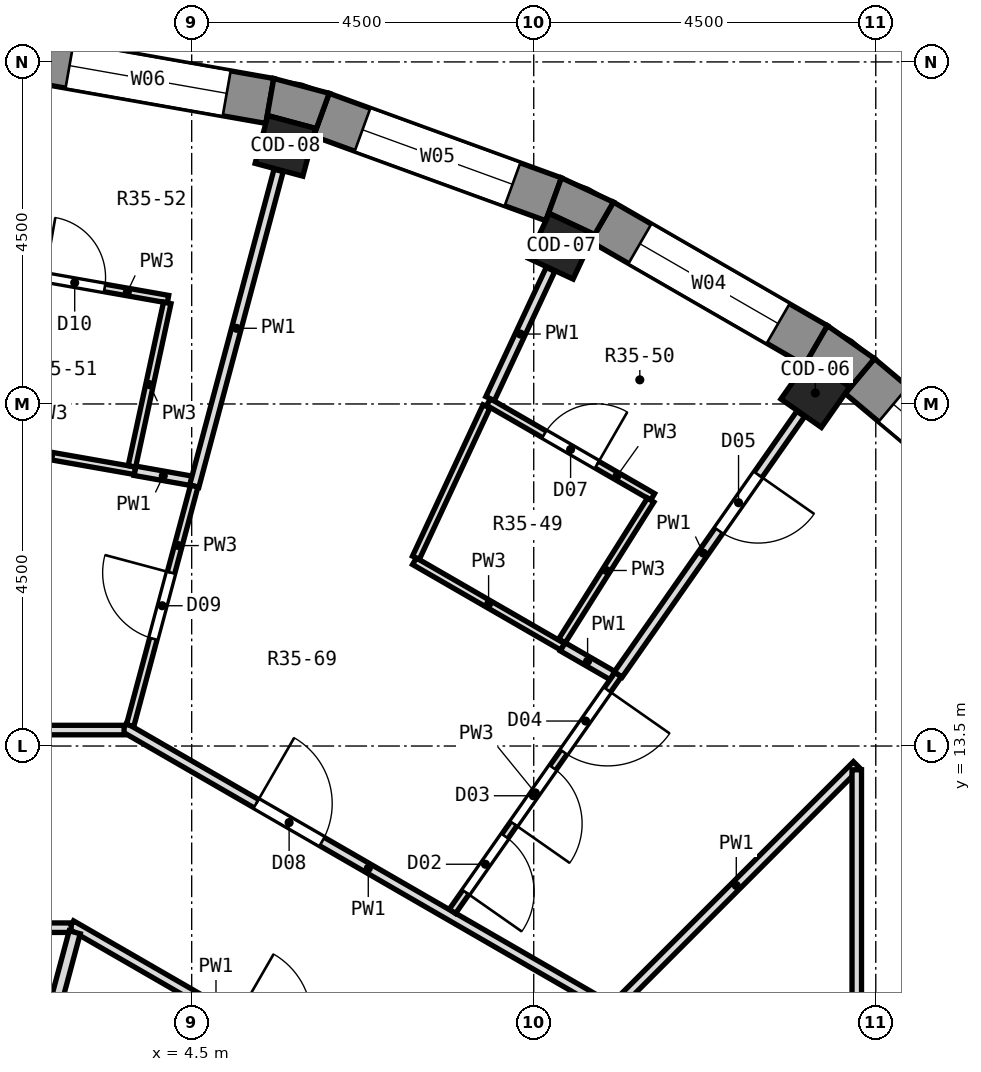
"""IFC4 building model, lengths in metres.
Left out: names, types, materials, properties, quantities, classifications, styles, units other than length and angle.
Written with IfcOpenShell. Run it as: python <this file> out.ifc"""

import sys

from ifc_helpers import new_model, si_unit, direction, frame, frame_2d, origin, origin_2d, place, context, subcontext, project, spatial, polyline, rectangle, outline, extrude, element, fill, save


model = new_model("IFC4")
c1 = context("Model", 3, precision=1e-05, world=origin(), true_north=direction((0.0, 1.0)))
c2 = subcontext(c1, "Body", "Model", "MODEL_VIEW")
j1 = project(units=[si_unit("LENGTHUNIT", "METRE"), si_unit("PLANEANGLEUNIT", "RADIAN")], contexts=[c1])
p1 = place(None, origin())
s1 = spatial("IfcSite", under=j1, at=p1, CompositionType="ELEMENT")
p2 = place(p1, origin())
s2 = spatial("IfcBuilding", under=s1, at=p2, CompositionType="ELEMENT")
p3 = place(p2, frame((0.0, 0.0, 249.5)))
s3 = spatial("IfcBuildingStorey", under=s2, at=p3, CompositionType="ELEMENT", Elevation=249.5)
for number, where, z_axis, x_axis in (
    (1, (12.705, 18.144, 0.0), (0.0, 0.0, 1.0), (0.574, 0.819, 0.0)),
    (2, (9.361, 20.075, 0.0), (0.0, 0.0, 1.0), (0.423, 0.906, 0.0)),
    (3, (5.733, 21.395, 0.0), (0.0, 0.0, 1.0), (0.259, 0.966, 0.0)),
):
    element("IfcColumn", number, at=place(p3, frame(where, z_axis=z_axis, x_axis=x_axis)), inside=s3, PredefinedType="COLUMN", context=c2, shape_type="SweptSolid", body=[
        extrude(rectangle(XDim=0.65, YDim=0.65, at=origin_2d()), origin(), (0.0, 0.0, 1.0), 3.3),
    ])
p4 = place(p3, frame((15.781, 16.277, 0.0), z_axis=(0.0, 0.0, 1.0), x_axis=(-0.766056773982, 0.64277291405, 0.0)))
e4 = element("IfcWall", 4, at=p4, inside=s3, PredefinedType="SOLIDWALL", context=c2, shape_type="SweptSolid", body=[
    extrude(rectangle(XDim=3.252, YDim=0.6, at=frame_2d((1.626, 0.0))), origin(), (0.0, 0.0, 1.0), 2.9),
])
p5 = place(p4, frame((0.576, 0.0, 0.9)))
e5 = element("IfcOpeningElement", 5, at=p5, cuts=e4, PredefinedType="OPENING", context=c2, shape_type="SweptSolid", body=[
    extrude(rectangle(XDim=2.1, YDim=1.8, at=frame_2d((1.05, 0.9))), frame((0.0, 0.312, 0.0), z_axis=(0.0, -1.0, 0.0), x_axis=(1.0, 0.0, 0.0)), (0.0, 0.0, 1.0), 0.624),
])
p6 = place(p3, frame((12.714, 18.77, 0.0), z_axis=(0.0, 0.0, 1.0), x_axis=(-0.866016800201, 0.500014901547, 0.0)))
e6 = element("IfcWall", 6, at=p6, inside=s3, PredefinedType="SOLIDWALL", context=c2, shape_type="SweptSolid", body=[
    extrude(rectangle(XDim=3.252, YDim=0.6, at=frame_2d((1.626, 0.0))), origin(), (0.0, 0.0, 1.0), 2.9),
])
p7 = place(p6, frame((0.576, 0.0, 0.9)))
e7 = element("IfcOpeningElement", 7, at=p7, cuts=e6, PredefinedType="OPENING", context=c2, shape_type="SweptSolid", body=[
    extrude(rectangle(XDim=2.1, YDim=1.8, at=frame_2d((1.05, 0.9))), frame((0.0, 0.312, 0.0), z_axis=(0.0, -1.0, 0.0), x_axis=(1.0, 0.0, 0.0)), (0.0, 0.0, 1.0), 0.624),
])
p8 = place(p3, frame((9.262, 20.693, 0.0), z_axis=(0.0, 0.0, 1.0), x_axis=(-0.939679383794, 0.342056509473, 0.0)))
e8 = element("IfcWall", 8, at=p8, inside=s3, PredefinedType="SOLIDWALL", context=c2, shape_type="SweptSolid", body=[
    extrude(rectangle(XDim=3.252, YDim=0.6, at=frame_2d((1.626, 0.0))), origin(), (0.0, 0.0, 1.0), 2.9),
])
p9 = place(p8, frame((0.576, 0.0, 0.9)))
e9 = element("IfcOpeningElement", 9, at=p9, cuts=e8, PredefinedType="OPENING", context=c2, shape_type="SweptSolid", body=[
    extrude(rectangle(XDim=2.1, YDim=1.8, at=frame_2d((1.05, 0.9))), frame((0.0, 0.312, 0.0), z_axis=(0.0, -1.0, 0.0), x_axis=(1.0, 0.0, 0.0)), (0.0, 0.0, 1.0), 0.624),
])
p10 = place(p3, frame((5.528, 21.987, 0.0), z_axis=(0.0, 0.0, 1.0), x_axis=(-0.984806225186, 0.173656842178, 0.0)))
e10 = element("IfcWall", 10, at=p10, inside=s3, PredefinedType="SOLIDWALL", context=c2, shape_type="SweptSolid", body=[
    extrude(rectangle(XDim=3.252, YDim=0.6, at=frame_2d((1.626, 0.0))), origin(), (0.0, 0.0, 1.0), 2.9),
])
p11 = place(p10, frame((0.576, 0.0, 0.9)))
e11 = element("IfcOpeningElement", 11, at=p11, cuts=e10, PredefinedType="OPENING", context=c2, shape_type="SweptSolid", body=[
    extrude(rectangle(XDim=2.1, YDim=1.8, at=frame_2d((1.05, 0.9))), frame((0.0, 0.312, 0.0), z_axis=(0.0, -1.0, 0.0), x_axis=(1.0, 0.0, 0.0)), (0.0, 0.0, 1.0), 0.624),
])
p12 = place(p3, origin())
e12 = element("IfcWall", 12, at=p12, inside=s3, PredefinedType="SOLIDWALL", context=c2, shape_type="SweptSolid", body=[
    extrude(outline(polyline([(12.864, 19.03), (12.564, 18.51), (12.625, 18.597), (13.157, 18.224), (13.097, 18.137), (13.482, 18.597), (12.864, 19.03)])), origin(), (0.0, 0.0, 1.0), 2.9),
])
p13 = place(p3, origin())
e13 = element("IfcWall", 13, at=p13, inside=s3, PredefinedType="SOLIDWALL", context=c2, shape_type="SweptSolid", body=[
    extrude(outline(polyline([(10.048, 20.656), (9.364, 20.975), (9.159, 20.411), (9.204, 20.507), (9.793, 20.232), (9.748, 20.136), (10.048, 20.656)])), origin(), (0.0, 0.0, 1.0), 2.9),
])
p14 = place(p3, origin())
e14 = element("IfcWall", 14, at=p14, inside=s3, PredefinedType="SOLIDWALL", context=c2, shape_type="SweptSolid", body=[
    extrude(outline(polyline([(5.58, 22.282), (5.476, 21.691), (5.503, 21.793), (6.131, 21.625), (6.104, 21.523), (6.309, 22.087), (5.58, 22.282)])), origin(), (0.0, 0.0, 1.0), 2.9),
])
p15 = place(p3, frame((2.915, 11.146, 0.0), z_axis=(0.0, 0.0, 1.0), x_axis=(0.866022982797, -0.500004193249, 0.0)))
e15 = element("IfcWall", 15, at=p15, inside=s3, PredefinedType="PARTITIONING", context=c2, shape_type="SweptSolid", body=[
    extrude(rectangle(XDim=6.026, YDim=0.125, at=frame_2d((3.013, 0.0))), origin(), (0.0, 0.0, 1.0), 2.9),
])
p16 = place(p15, frame((2.498, 0.0, 0.0)))
e16 = element("IfcOpeningElement", 16, at=p16, cuts=e15, PredefinedType="OPENING", context=c2, shape_type="SweptSolid", body=[
    extrude(rectangle(XDim=1.0, YDim=2.1, at=frame_2d((0.5, 1.05))), frame((0.0, 0.074, 0.0), z_axis=(0.0, -1.0, 0.0), x_axis=(1.0, 0.0, 0.0)), (0.0, 0.0, 1.0), 0.149),
])
p17 = place(p3, frame((3.611, 13.747, 0.0), z_axis=(0.0, 0.0, 1.0), x_axis=(0.865964194244, -0.500106003051, 0.0)))
e17 = element("IfcWall", 17, at=p17, inside=s3, PredefinedType="PARTITIONING", context=c2, shape_type="SweptSolid", body=[
    extrude(rectangle(XDim=7.42, YDim=0.125, at=frame_2d((3.71, 0.0))), origin(), (0.0, 0.0, 1.0), 2.9),
])
p18 = place(p17, frame((2.007, 0.0, 0.0)))
e18 = element("IfcOpeningElement", 18, at=p18, cuts=e17, PredefinedType="OPENING", context=c2, shape_type="SweptSolid", body=[
    extrude(rectangle(XDim=1.0, YDim=2.1, at=frame_2d((0.5, 1.05))), frame((0.0, 0.074, 0.0), z_axis=(0.0, -1.0, 0.0), x_axis=(1.0, 0.0, 0.0)), (0.0, 0.0, 1.0), 0.149),
])
p19 = place(p3, frame((7.431, 15.931, 0.0), z_axis=(0.0, 0.0, 1.0), x_axis=(0.866046587367, -0.499963307164, 0.0)))
e19 = element("IfcWall", 19, at=p19, inside=s3, PredefinedType="PARTITIONING", context=c2, shape_type="SweptSolid", body=[
    extrude(rectangle(XDim=2.252, YDim=0.1, at=frame_2d((1.126, 0.0))), origin(), (0.0, 0.0, 1.0), 2.9),
])
p20 = place(p3, frame((9.381, 14.805, 0.0), z_axis=(0.0, 0.0, 1.0), x_axis=(0.866088799389, -0.499890179513, 0.0)))
e20 = element("IfcWall", 20, at=p20, inside=s3, PredefinedType="PARTITIONING", context=c2, shape_type="SweptSolid", body=[
    extrude(rectangle(XDim=0.756, YDim=0.125, at=frame_2d((0.378, 0.0))), origin(), (0.0, 0.0, 1.0), 2.9),
])
p21 = place(p3, frame((8.405, 18.025, 0.0), z_axis=(0.0, 0.0, 1.0), x_axis=(0.866060068719, -0.499939953764, 0.0)))
e21 = element("IfcWall", 21, at=p21, inside=s3, PredefinedType="PARTITIONING", context=c2, shape_type="SweptSolid", body=[
    extrude(rectangle(XDim=2.494, YDim=0.1, at=frame_2d((1.247, 0.0))), origin(), (0.0, 0.0, 1.0), 2.9),
])
p22 = place(p21, frame((0.847, 0.0, 0.0)))
e22 = element("IfcOpeningElement", 22, at=p22, cuts=e21, PredefinedType="OPENING", context=c2, shape_type="SweptSolid", body=[
    extrude(rectangle(XDim=0.8, YDim=2.1, at=frame_2d((0.4, 1.05))), frame((0.0, 0.062, 0.0), z_axis=(0.0, -1.0, 0.0), x_axis=(1.0, 0.0, 0.0)), (0.0, 0.0, 1.0), 0.124),
])
p23 = place(p3, frame((3.752, 17.121, 0.0), z_axis=(0.0, 0.0, 1.0), x_axis=(0.984637536595, -0.174610771512, 0.0)))
e23 = element("IfcWall", 23, at=p23, inside=s3, PredefinedType="PARTITIONING", context=c2, shape_type="SweptSolid", body=[
    extrude(rectangle(XDim=0.759, YDim=0.125, at=frame_2d((0.38, 0.0))), origin(), (0.0, 0.0, 1.0), 2.9),
])
p24 = place(p3, frame((1.532, 17.512, 0.0), z_axis=(0.0, 0.0, 1.0), x_axis=(0.984872829854, -0.173278703295, 0.0)))
e24 = element("IfcWall", 24, at=p24, inside=s3, PredefinedType="PARTITIONING", context=c2, shape_type="SweptSolid", body=[
    extrude(rectangle(XDim=2.254, YDim=0.1, at=frame_2d((1.127, 0.0))), origin(), (0.0, 0.0, 1.0), 2.9),
])
p25 = place(p3, frame((1.733, 19.812, 0.0), z_axis=(0.0, 0.0, 1.0), x_axis=(0.984805232191, -0.17366247335, 0.0)))
e25 = element("IfcWall", 25, at=p25, inside=s3, PredefinedType="PARTITIONING", context=c2, shape_type="SweptSolid", body=[
    extrude(rectangle(XDim=2.494, YDim=0.1, at=frame_2d((1.247, 0.0))), origin(), (0.0, 0.0, 1.0), 2.9),
])
p26 = place(p25, frame((0.847, 0.0, 0.0)))
e26 = element("IfcOpeningElement", 26, at=p26, cuts=e25, PredefinedType="OPENING", context=c2, shape_type="SweptSolid", body=[
    extrude(rectangle(XDim=0.8, YDim=2.1, at=frame_2d((0.4, 1.05))), frame((0.0, 0.062, 0.0), z_axis=(0.0, -1.0, 0.0), x_axis=(1.0, 0.0, 0.0)), (0.0, 0.0, 1.0), 0.124),
])
p27 = place(p3, frame((-3.063, 11.11, 0.0), z_axis=(0.0, 0.0, 1.0), x_axis=(1.0, 0.0, 0.0)))
e27 = element("IfcWall", 27, at=p27, inside=s3, PredefinedType="PARTITIONING", context=c2, shape_type="SweptSolid", body=[
    extrude(rectangle(XDim=5.978, YDim=0.125, at=frame_2d((2.989, 0.0))), origin(), (0.0, 0.0, 1.0), 2.9),
])
p28 = place(p27, frame((2.614, 0.0, 0.0)))
e28 = element("IfcOpeningElement", 28, at=p28, cuts=e27, PredefinedType="OPENING", context=c2, shape_type="SweptSolid", body=[
    extrude(rectangle(XDim=1.0, YDim=2.1, at=frame_2d((0.5, 1.05))), frame((0.0, 0.074, 0.0), z_axis=(0.0, -1.0, 0.0), x_axis=(1.0, 0.0, 0.0)), (0.0, 0.0, 1.0), 0.149),
])
p29 = place(p3, frame((-3.746, 13.71, 0.0), z_axis=(0.0, 0.0, 1.0), x_axis=(1.0, 0.0, 0.0)))
e29 = element("IfcWall", 29, at=p29, inside=s3, PredefinedType="PARTITIONING", context=c2, shape_type="SweptSolid", body=[
    extrude(rectangle(XDim=7.357, YDim=0.125, at=frame_2d((3.678, 0.0))), origin(), (0.0, 0.0, 1.0), 2.9),
])
p30 = place(p3, frame((10.08, 10.08, 0.0), z_axis=(0.0, 0.0, 1.0), x_axis=(0.707106781187, 0.707106781187, 0.0)))
e30 = element("IfcWall", 30, at=p30, inside=s3, PredefinedType="PARTITIONING", context=c2, shape_type="SweptSolid", body=[
    extrude(rectangle(XDim=4.483, YDim=0.125, at=frame_2d((2.241, 0.0))), origin(), (0.0, 0.0, 1.0), 2.9),
])
p31 = place(p3, frame((7.93, 11.325, 0.0), z_axis=(0.0, 0.0, 1.0), x_axis=(0.57357434303, 0.819153510044, 0.0)))
e31 = element("IfcWall", 31, at=p31, inside=s3, PredefinedType="PARTITIONING", context=c2, shape_type="SweptSolid", body=[
    extrude(rectangle(XDim=3.803, YDim=0.1, at=frame_2d((1.902, 0.0))), origin(), (0.0, 0.0, 1.0), 2.9),
])
p32 = place(p31, frame((0.306, 0.0, 0.0)))
e32 = element("IfcOpeningElement", 32, at=p32, cuts=e31, PredefinedType="OPENING", context=c2, shape_type="SweptSolid", body=[
    extrude(rectangle(XDim=0.9, YDim=2.1, at=frame_2d((0.45, 1.05))), frame((0.0, 0.062, 0.0), z_axis=(0.0, -1.0, 0.0), x_axis=(1.0, 0.0, 0.0)), (0.0, 0.0, 1.0), 0.124),
])
p33 = place(p31, frame((1.406, 0.0, 0.0)))
e33 = element("IfcOpeningElement", 33, at=p33, cuts=e31, PredefinedType="OPENING", context=c2, shape_type="SweptSolid", body=[
    extrude(rectangle(XDim=0.9, YDim=2.1, at=frame_2d((0.45, 1.05))), frame((0.0, 0.062, 0.0), z_axis=(0.0, -1.0, 0.0), x_axis=(1.0, 0.0, 0.0)), (0.0, 0.0, 1.0), 0.124),
])
p34 = place(p31, frame((2.556, 0.0, 0.0)))
e34 = element("IfcOpeningElement", 34, at=p34, cuts=e31, PredefinedType="OPENING", context=c2, shape_type="SweptSolid", body=[
    extrude(rectangle(XDim=1.0, YDim=2.1, at=frame_2d((0.5, 1.05))), frame((0.0, 0.062, 0.0), z_axis=(0.0, -1.0, 0.0), x_axis=(1.0, 0.0, 0.0)), (0.0, 0.0, 1.0), 0.124),
])
p35 = place(p3, frame((10.112, 14.441, 0.0), z_axis=(0.0, 0.0, 1.0), x_axis=(0.57362673896, 0.819116819721, 0.0)))
e35 = element("IfcWall", 35, at=p35, inside=s3, PredefinedType="PARTITIONING", context=c2, shape_type="SweptSolid", body=[
    extrude(rectangle(XDim=4.186, YDim=0.125, at=frame_2d((2.093, 0.0))), origin(), (0.0, 0.0, 1.0), 2.9),
])
p36 = place(p35, frame((2.309, 0.0, 0.0)))
e36 = element("IfcOpeningElement", 36, at=p36, cuts=e35, PredefinedType="OPENING", context=c2, shape_type="SweptSolid", body=[
    extrude(rectangle(XDim=0.9, YDim=2.1, at=frame_2d((0.45, 1.05))), frame((0.0, 0.074, 0.0), z_axis=(0.0, -1.0, 0.0), x_axis=(1.0, 0.0, 0.0)), (0.0, 0.0, 1.0), 0.149),
])
p37 = place(p3, frame((9.371, 14.883, 0.0), z_axis=(0.0, 0.0, 1.0), x_axis=(0.532952249521, 0.846145318329, 0.0)))
e37 = element("IfcWall", 37, at=p37, inside=s3, PredefinedType="PARTITIONING", context=c2, shape_type="SweptSolid", body=[
    extrude(rectangle(XDim=2.19, YDim=0.1, at=frame_2d((1.095, 0.0))), origin(), (0.0, 0.0, 1.0), 2.9),
])
p38 = place(p3, frame((8.426, 18.07, 0.0), z_axis=(0.0, 0.0, 1.0), x_axis=(0.423433748068, 0.905927072671, 0.0)))
e38 = element("IfcWall", 38, at=p38, inside=s3, PredefinedType="PARTITIONING", context=c2, shape_type="SweptSolid", body=[
    extrude(rectangle(XDim=1.877, YDim=0.125, at=frame_2d((0.938, 0.0))), origin(), (0.0, 0.0, 1.0), 2.9),
])
p39 = place(p3, frame((7.45, 15.977, 0.0), z_axis=(0.0, 0.0, 1.0), x_axis=(0.422642091252, 0.906296674772, 0.0)))
e39 = element("IfcWall", 39, at=p39, inside=s3, PredefinedType="PARTITIONING", context=c2, shape_type="SweptSolid", body=[
    extrude(rectangle(XDim=2.197, YDim=0.1, at=frame_2d((1.098, 0.0))), origin(), (0.0, 0.0, 1.0), 2.9),
])
p40 = place(p3, frame((4.534, 16.92, 0.0), z_axis=(0.0, 0.0, 1.0), x_axis=(0.258154015952, 0.966103774989, 0.0)))
e40 = element("IfcWall", 40, at=p40, inside=s3, PredefinedType="PARTITIONING", context=c2, shape_type="SweptSolid", body=[
    extrude(rectangle(XDim=4.298, YDim=0.125, at=frame_2d((2.149, 0.0))), origin(), (0.0, 0.0, 1.0), 2.9),
])
p41 = place(p3, frame((3.69, 13.77, 0.0), z_axis=(0.0, 0.0, 1.0), x_axis=(0.258711132493, 0.965954734925, 0.0)))
e41 = element("IfcWall", 41, at=p41, inside=s3, PredefinedType="PARTITIONING", context=c2, shape_type="SweptSolid", body=[
    extrude(rectangle(XDim=3.26, YDim=0.1, at=frame_2d((1.63, 0.0))), origin(), (0.0, 0.0, 1.0), 2.9),
])
p42 = place(p41, frame((1.181, 0.0, 0.0)))
e42 = element("IfcOpeningElement", 42, at=p42, cuts=e41, PredefinedType="OPENING", context=c2, shape_type="SweptSolid", body=[
    extrude(rectangle(XDim=0.9, YDim=2.1, at=frame_2d((0.45, 1.05))), frame((0.0, 0.062, 0.0), z_axis=(0.0, -1.0, 0.0), x_axis=(1.0, 0.0, 0.0)), (0.0, 0.0, 1.0), 0.124),
])
p43 = place(p3, frame((2.444, 9.12, 0.0), z_axis=(0.0, 0.0, 1.0), x_axis=(0.258780892738, 0.965936048377, 0.0)))
e43 = element("IfcWall", 43, at=p43, inside=s3, PredefinedType="PARTITIONING", context=c2, shape_type="SweptSolid", body=[
    extrude(rectangle(XDim=1.997, YDim=0.15, at=frame_2d((0.999, 0.0))), origin(), (0.0, 0.0, 1.0), 2.9),
])
p44 = place(p3, frame((3.714, 17.179, 0.0), z_axis=(0.0, 0.0, 1.0), x_axis=(0.21121821869, 0.977438931133, 0.0)))
e44 = element("IfcWall", 44, at=p44, inside=s3, PredefinedType="PARTITIONING", context=c2, shape_type="SweptSolid", body=[
    extrude(rectangle(XDim=2.201, YDim=0.1, at=frame_2d((1.1, 0.0))), origin(), (0.0, 0.0, 1.0), 2.9),
])
p45 = place(p3, frame((13.25, 9.25, 0.0), z_axis=(0.0, 0.0, 1.0), x_axis=(0.0, 1.0, 0.0)))
e45 = element("IfcWall", 45, at=p45, inside=s3, PredefinedType="PARTITIONING", context=c2, shape_type="SweptSolid", body=[
    extrude(rectangle(XDim=3.938, YDim=0.125, at=frame_2d((1.969, 0.0))), origin(), (0.0, 0.0, 1.0), 2.9),
])
p46 = place(p5, origin())
e46 = element("IfcWindow", 46, at=p46, inside=s3, PartitioningType="SINGLE_PANEL", PredefinedType="WINDOW", context=c2, shape_type="SweptSolid", body=[
    extrude(rectangle(XDim=2.1, YDim=1.8, at=frame_2d((1.05, 0.9))), frame((0.0, 0.18, 0.0), z_axis=(0.0, -1.0, 0.0), x_axis=(1.0, 0.0, 0.0)), (0.0, 0.0, 1.0), 0.06),
])
fill(e5, e46)
p47 = place(p7, origin())
e47 = element("IfcWindow", 47, at=p47, inside=s3, PartitioningType="SINGLE_PANEL", PredefinedType="WINDOW", context=c2, shape_type="SweptSolid", body=[
    extrude(rectangle(XDim=2.1, YDim=1.8, at=frame_2d((1.05, 0.9))), frame((0.0, 0.18, 0.0), z_axis=(0.0, -1.0, 0.0), x_axis=(1.0, 0.0, 0.0)), (0.0, 0.0, 1.0), 0.06),
])
fill(e7, e47)
p48 = place(p9, origin())
e48 = element("IfcWindow", 48, at=p48, inside=s3, PartitioningType="SINGLE_PANEL", PredefinedType="WINDOW", context=c2, shape_type="SweptSolid", body=[
    extrude(rectangle(XDim=2.1, YDim=1.8, at=frame_2d((1.05, 0.9))), frame((0.0, 0.18, 0.0), z_axis=(0.0, -1.0, 0.0), x_axis=(1.0, 0.0, 0.0)), (0.0, 0.0, 1.0), 0.06),
])
fill(e9, e48)
p49 = place(p11, origin())
e49 = element("IfcWindow", 49, at=p49, inside=s3, PartitioningType="SINGLE_PANEL", PredefinedType="WINDOW", context=c2, shape_type="SweptSolid", body=[
    extrude(rectangle(XDim=2.1, YDim=1.8, at=frame_2d((1.05, 0.9))), frame((0.0, 0.18, 0.0), z_axis=(0.0, -1.0, 0.0), x_axis=(1.0, 0.0, 0.0)), (0.0, 0.0, 1.0), 0.06),
])
fill(e11, e49)
p50 = place(p32, frame((0.9, 0.0, 0.0), z_axis=(0.0, 0.0, 1.0), x_axis=(-1.0, 0.0, 0.0)))
e50 = element("IfcDoor", 50, at=p50, inside=s3, OperationType="SINGLE_SWING_RIGHT", PredefinedType="DOOR", context=c2, shape_type="SweptSolid", body=[
    extrude(rectangle(XDim=0.9, YDim=2.1, at=frame_2d((0.45, 1.05))), frame((0.0, 0.025, 0.0), z_axis=(0.0, -1.0, 0.0), x_axis=(1.0, 0.0, 0.0)), (0.0, 0.0, 1.0), 0.05),
])
fill(e32, e50)
p51 = place(p33, frame((0.9, 0.0, 0.0), z_axis=(0.0, 0.0, 1.0), x_axis=(-1.0, 0.0, 0.0)))
e51 = element("IfcDoor", 51, at=p51, inside=s3, OperationType="SINGLE_SWING_RIGHT", PredefinedType="DOOR", context=c2, shape_type="SweptSolid", body=[
    extrude(rectangle(XDim=0.9, YDim=2.1, at=frame_2d((0.45, 1.05))), frame((0.0, 0.025, 0.0), z_axis=(0.0, -1.0, 0.0), x_axis=(1.0, 0.0, 0.0)), (0.0, 0.0, 1.0), 0.05),
])
fill(e33, e51)
p52 = place(p34, frame((1.0, 0.0, 0.0), z_axis=(0.0, 0.0, 1.0), x_axis=(-1.0, 0.0, 0.0)))
e52 = element("IfcDoor", 52, at=p52, inside=s3, OperationType="SINGLE_SWING_LEFT", PredefinedType="DOOR", context=c2, shape_type="SweptSolid", body=[
    extrude(rectangle(XDim=1.0, YDim=2.1, at=frame_2d((0.5, 1.05))), frame((0.0, 0.025, 0.0), z_axis=(0.0, -1.0, 0.0), x_axis=(1.0, 0.0, 0.0)), (0.0, 0.0, 1.0), 0.05),
])
fill(e34, e52)
p53 = place(p36, frame((0.9, 0.0, 0.0), z_axis=(0.0, 0.0, 1.0), x_axis=(-1.0, 0.0, 0.0)))
e53 = element("IfcDoor", 53, at=p53, inside=s3, OperationType="SINGLE_SWING_LEFT", PredefinedType="DOOR", context=c2, shape_type="SweptSolid", body=[
    extrude(rectangle(XDim=0.9, YDim=2.1, at=frame_2d((0.45, 1.05))), frame((0.0, 0.025, 0.0), z_axis=(0.0, -1.0, 0.0), x_axis=(1.0, 0.0, 0.0)), (0.0, 0.0, 1.0), 0.05),
])
fill(e36, e53)
p54 = place(p22, origin())
e54 = element("IfcDoor", 54, at=p54, inside=s3, OperationType="SINGLE_SWING_RIGHT", PredefinedType="DOOR", context=c2, shape_type="SweptSolid", body=[
    extrude(rectangle(XDim=0.8, YDim=2.1, at=frame_2d((0.4, 1.05))), frame((0.0, 0.025, 0.0), z_axis=(0.0, -1.0, 0.0), x_axis=(1.0, 0.0, 0.0)), (0.0, 0.0, 1.0), 0.05),
])
fill(e22, e54)
p55 = place(p18, origin())
e55 = element("IfcDoor", 55, at=p55, inside=s3, OperationType="SINGLE_SWING_LEFT", PredefinedType="DOOR", context=c2, shape_type="SweptSolid", body=[
    extrude(rectangle(XDim=1.0, YDim=2.1, at=frame_2d((0.5, 1.05))), frame((0.0, 0.025, 0.0), z_axis=(0.0, -1.0, 0.0), x_axis=(1.0, 0.0, 0.0)), (0.0, 0.0, 1.0), 0.05),
])
fill(e18, e55)
p56 = place(p42, origin())
e56 = element("IfcDoor", 56, at=p56, inside=s3, OperationType="SINGLE_SWING_RIGHT", PredefinedType="DOOR", context=c2, shape_type="SweptSolid", body=[
    extrude(rectangle(XDim=0.9, YDim=2.1, at=frame_2d((0.45, 1.05))), frame((0.0, 0.025, 0.0), z_axis=(0.0, -1.0, 0.0), x_axis=(1.0, 0.0, 0.0)), (0.0, 0.0, 1.0), 0.05),
])
fill(e42, e56)
p57 = place(p26, origin())
e57 = element("IfcDoor", 57, at=p57, inside=s3, OperationType="SINGLE_SWING_LEFT", PredefinedType="DOOR", context=c2, shape_type="SweptSolid", body=[
    extrude(rectangle(XDim=0.8, YDim=2.1, at=frame_2d((0.4, 1.05))), frame((0.0, 0.025, 0.0), z_axis=(0.0, -1.0, 0.0), x_axis=(1.0, 0.0, 0.0)), (0.0, 0.0, 1.0), 0.05),
])
fill(e26, e57)
save(model, sys.argv[1])
